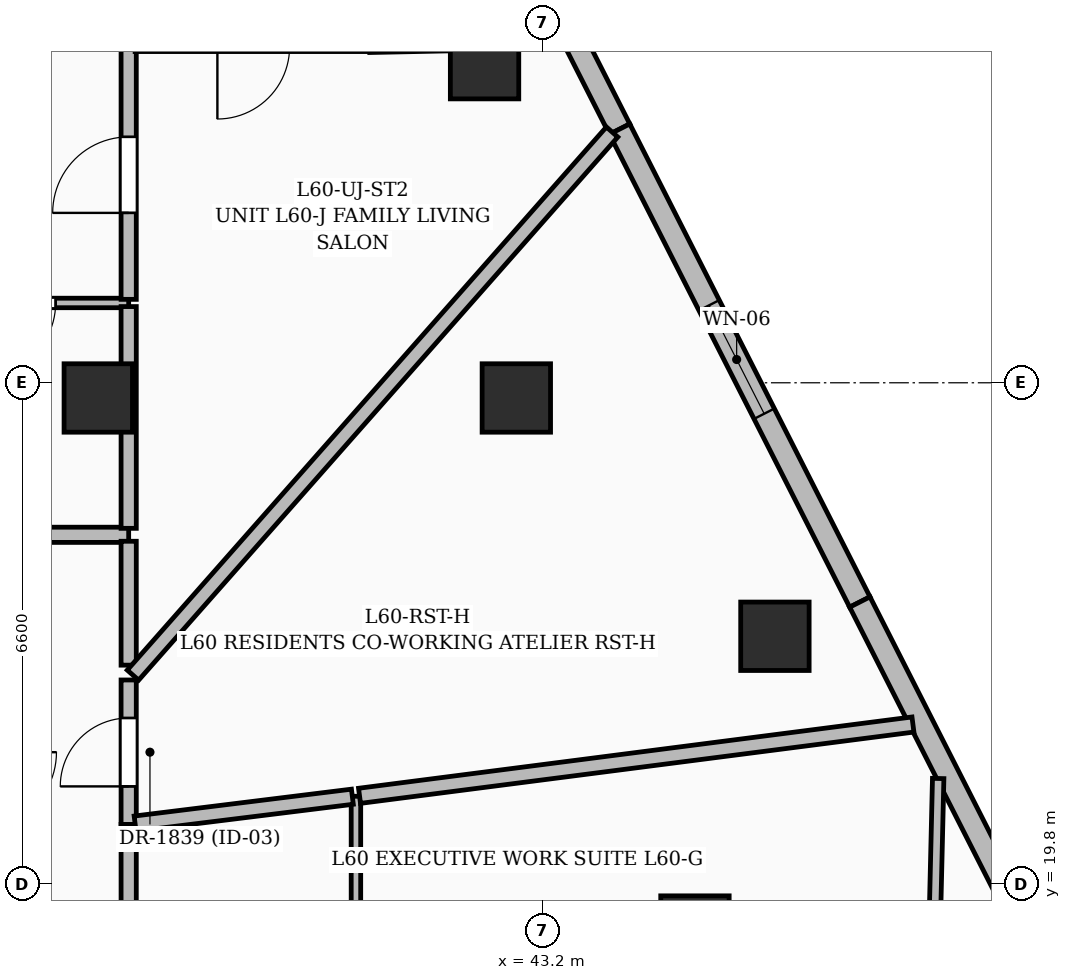
"""IFC4 building model, lengths in metres.
Left out: names, types, materials, properties, quantities, classifications, styles, units other than length and angle.
Written with IfcOpenShell. Run it as: python <this file> out.ifc"""

import sys

from ifc_helpers import new_model, si_unit, direction, frame, frame_2d, origin, origin_2d, place, context, subcontext, project, spatial, rectangle, extrude, element, fill, save


model = new_model("IFC4")
c1 = context("Model", 3, precision=1e-05, world=origin(), true_north=direction((0.0, 1.0)))
c2 = subcontext(c1, "Body", "Model", "MODEL_VIEW")
j1 = project(units=[si_unit("LENGTHUNIT", "METRE"), si_unit("PLANEANGLEUNIT", "RADIAN")], contexts=[c1])
p1 = place(None, origin())
s1 = spatial("IfcSite", under=j1, at=p1, CompositionType="ELEMENT")
p2 = place(p1, origin())
s2 = spatial("IfcBuilding", under=s1, at=p2, CompositionType="ELEMENT")
p3 = place(p2, frame((0.0, 0.0, 233.25)))
s3 = spatial("IfcBuildingStorey", under=s2, at=p3, CompositionType="ELEMENT", Elevation=233.25)
for number, where, z_axis, x_axis in (
    (1, (45.2, 19.2, 0.0), (0.0, 0.0, 1.0), (1.0, 0.0, 0.0)),
    (2, (42.85, 26.2, 0.0), (0.0, 0.0, 1.0), (1.0, 0.0, 0.0)),
    (3, (37.35, 26.2, 0.0), (0.0, 0.0, 1.0), (1.0, 0.0, 0.0)),
    (4, (46.252, 23.065, 0.0), (0.0, 0.0, 1.0), (1.0, 0.0, 0.0)),
    (5, (42.432, 30.585, 0.0), (0.0, 0.0, 1.0), (1.0, 0.0, 0.0)),
):
    element("IfcColumn", number, at=place(p3, frame(where, z_axis=z_axis, x_axis=x_axis)), inside=s3, PredefinedType="COLUMN", context=c2, shape_type="SweptSolid", body=[
        extrude(rectangle(XDim=0.9, YDim=0.9, at=origin_2d()), origin(), (0.0, 0.0, 1.0), 3.75),
    ])
p4 = place(p3, frame((41.313, 35.437, 0.0), z_axis=(0.0, 0.0, 1.0), x_axis=(0.452902075909, -0.891560266969, 0.0)))
e6 = element("IfcWall", 6, at=p4, inside=s3, PredefinedType="SOLIDWALL", context=c2, shape_type="SweptSolid", body=[
    extrude(rectangle(XDim=6.393, YDim=0.3, at=frame_2d((3.197, 0.0))), origin(), (0.0, 0.0, 1.0), 3.5),
])
p5 = place(p4, frame((1.79, 0.0, 0.6)))
e7 = element("IfcOpeningElement", 7, at=p5, cuts=e6, PredefinedType="OPENING", context=c2, shape_type="SweptSolid", body=[
    extrude(rectangle(XDim=1.8, YDim=2.1, at=frame_2d((0.9, 1.05))), frame((0.0, 0.16, 0.0), z_axis=(0.0, -1.0, 0.0), x_axis=(1.0, 0.0, 0.0)), (0.0, 0.0, 1.0), 0.32),
])
p6 = place(p3, frame((44.209, 29.737, 0.0), z_axis=(0.0, 0.0, 1.0), x_axis=(0.452858393735, -0.891582455651, 0.0)))
e8 = element("IfcWall", 8, at=p6, inside=s3, PredefinedType="SOLIDWALL", context=c2, shape_type="SweptSolid", body=[
    extrude(rectangle(XDim=6.978, YDim=0.3, at=frame_2d((3.489, 0.0))), origin(), (0.0, 0.0, 1.0), 3.5),
])
p7 = place(p6, frame((2.6, 0.0, 0.55)))
e9 = element("IfcOpeningElement", 9, at=p7, cuts=e8, PredefinedType="OPENING", context=c2, shape_type="SweptSolid", body=[
    extrude(rectangle(XDim=1.6, YDim=2.2, at=frame_2d((0.8, 1.1))), frame((0.0, 0.16, 0.0), z_axis=(0.0, -1.0, 0.0), x_axis=(1.0, 0.0, 0.0)), (0.0, 0.0, 1.0), 0.32),
])
p8 = place(p3, frame((47.369, 23.516, 0.0), z_axis=(0.0, 0.0, 1.0), x_axis=(0.452872520075, -0.891575280367, 0.0)))
e10 = element("IfcWall", 10, at=p8, inside=s3, PredefinedType="SOLIDWALL", context=c2, shape_type="SweptSolid", body=[
    extrude(rectangle(XDim=6.978, YDim=0.3, at=frame_2d((3.489, 0.0))), origin(), (0.0, 0.0, 1.0), 3.5),
])
p9 = place(p8, frame((4.15, 0.0, 0.6)))
e11 = element("IfcOpeningElement", 11, at=p9, cuts=e10, PredefinedType="OPENING", context=c2, shape_type="SweptSolid", body=[
    extrude(rectangle(XDim=1.5, YDim=2.1, at=frame_2d((0.75, 1.05))), frame((0.0, 0.16, 0.0), z_axis=(0.0, -1.0, 0.0), x_axis=(1.0, 0.0, 0.0)), (0.0, 0.0, 1.0), 0.32),
])
p10 = place(p3, frame((37.75, 16.835, 0.0), z_axis=(0.0, 0.0, 1.0), x_axis=(0.0, 1.0, 0.0)))
e12 = element("IfcWall", 12, at=p10, inside=s3, PredefinedType="PARTITIONING", context=c2, shape_type="SweptSolid", body=[
    extrude(rectangle(XDim=3.755, YDim=0.2, at=frame_2d((1.877, 0.0))), origin(), (0.0, 0.0, 1.0), 3.5),
])
p11 = place(p3, frame((37.75, 20.59, 0.0), z_axis=(0.0, 0.0, 1.0), x_axis=(0.0, 1.0, 0.0)))
e13 = element("IfcWall", 13, at=p11, inside=s3, PredefinedType="PARTITIONING", context=c2, shape_type="SweptSolid", body=[
    extrude(rectangle(XDim=1.9, YDim=0.2, at=frame_2d((0.95, 0.0))), origin(), (0.0, 0.0, 1.0), 3.5),
])
p12 = place(p11, frame((0.5, 0.0, 0.0)))
e14 = element("IfcOpeningElement", 14, at=p12, cuts=e13, PredefinedType="OPENING", context=c2, shape_type="SweptSolid", body=[
    extrude(rectangle(XDim=0.9, YDim=2.1, at=frame_2d((0.45, 1.05))), frame((0.0, 0.11, 0.0), z_axis=(0.0, -1.0, 0.0), x_axis=(1.0, 0.0, 0.0)), (0.0, 0.0, 1.0), 0.22),
])
p13 = place(p3, frame((37.75, 24.4, 0.0), z_axis=(0.0, 0.0, 1.0), x_axis=(-1.0, 0.0, 0.0)))
e15 = element("IfcWall", 15, at=p13, inside=s3, PredefinedType="PARTITIONING", context=c2, shape_type="SweptSolid", body=[
    extrude(rectangle(XDim=1.95, YDim=0.2, at=frame_2d((0.975, 0.0))), origin(), (0.0, 0.0, 1.0), 2.685),
])
p14 = place(p3, frame((37.75, 22.685, 0.0), z_axis=(0.0, 0.0, 1.0), x_axis=(0.0, 1.0, 0.0)))
e16 = element("IfcWall", 16, at=p14, inside=s3, PredefinedType="PARTITIONING", context=c2, shape_type="SweptSolid", body=[
    extrude(rectangle(XDim=1.63, YDim=0.2, at=frame_2d((0.815, 0.0))), origin(), (0.0, 0.0, 1.0), 3.5),
])
p15 = place(p3, frame((48.3, 16.96, 0.0), z_axis=(0.0, 0.0, 1.0), x_axis=(0.023576446584, 0.999722036951, 0.0)))
e17 = element("IfcWall", 17, at=p15, inside=s3, PredefinedType="PARTITIONING", context=c2, shape_type="SweptSolid", body=[
    extrude(rectangle(XDim=4.235, YDim=0.15, at=frame_2d((2.118, 0.0))), origin(), (0.0, 0.0, 1.0), 2.82),
])
p16 = place(p15, frame((1.679, 0.0, 0.0)))
e18 = element("IfcOpeningElement", 18, at=p16, cuts=e17, PredefinedType="OPENING", context=c2, shape_type="SweptSolid", body=[
    extrude(rectangle(XDim=0.85, YDim=2.1, at=frame_2d((0.425, 1.05))), frame((0.0, 0.085, 0.0), z_axis=(0.0, -1.0, 0.0), x_axis=(1.0, 0.0, 0.0)), (0.0, 0.0, 1.0), 0.17),
])
p17 = place(p3, frame((40.74, 20.96, 0.0), z_axis=(0.0, 0.0, 1.0), x_axis=(0.0, -1.0, 0.0)))
e19 = element("IfcWall", 19, at=p17, inside=s3, PredefinedType="PARTITIONING", context=c2, shape_type="SweptSolid", body=[
    extrude(rectangle(XDim=4.0, YDim=0.125, at=frame_2d((2.0, 0.0))), origin(), (0.0, 0.0, 1.0), 3.5),
])
p18 = place(p17, frame((1.525, 0.0, 0.0)))
e20 = element("IfcOpeningElement", 20, at=p18, cuts=e19, PredefinedType="OPENING", context=c2, shape_type="SweptSolid", body=[
    extrude(rectangle(XDim=0.95, YDim=2.2, at=frame_2d((0.475, 1.1))), frame((0.0, 0.072, 0.0), z_axis=(0.0, -1.0, 0.0), x_axis=(1.0, 0.0, 0.0)), (0.0, 0.0, 1.0), 0.145),
])
p19 = place(p3, frame((48.068, 21.904, 0.0), z_axis=(0.0, 0.0, 1.0), x_axis=(-0.991803716191, -0.127770843899, 0.0)))
e21 = element("IfcWall", 21, at=p19, inside=s3, PredefinedType="PARTITIONING", context=c2, shape_type="SweptSolid", body=[
    extrude(rectangle(XDim=7.341, YDim=0.2, at=frame_2d((3.67, 0.0))), origin(), (0.0, 0.0, 1.0), 2.685),
])
p20 = place(p3, frame((40.693, 20.954, 0.0), z_axis=(0.0, 0.0, 1.0), x_axis=(-0.992428411634, -0.122824459212, 0.0)))
e22 = element("IfcWall", 22, at=p20, inside=s3, PredefinedType="PARTITIONING", context=c2, shape_type="SweptSolid", body=[
    extrude(rectangle(XDim=2.88, YDim=0.2, at=frame_2d((1.44, 0.0))), origin(), (0.0, 0.0, 1.0), 3.5),
])
p21 = place(p3, frame((44.11, 29.699, 0.0), z_axis=(0.0, 0.0, 1.0), x_axis=(-0.661580960231, -0.749873744746, 0.0)))
e23 = element("IfcWall", 23, at=p21, inside=s3, PredefinedType="PARTITIONING", context=c2, shape_type="SweptSolid", body=[
    extrude(rectangle(XDim=9.529, YDim=0.2, at=frame_2d((4.764, 0.0))), origin(), (0.0, 0.0, 1.0), 2.685),
])
p22 = place(p3, frame((37.75, 27.45, 0.0), z_axis=(0.0, 0.0, 1.0), x_axis=(-1.0, 0.0, 0.0)))
e24 = element("IfcWall", 24, at=p22, inside=s3, PredefinedType="PARTITIONING", context=c2, shape_type="SweptSolid", body=[
    extrude(rectangle(XDim=2.52, YDim=0.125, at=frame_2d((1.26, 0.0))), origin(), (0.0, 0.0, 1.0), 2.685),
])
p23 = place(p22, frame((0.961, 0.0, 0.0)))
e25 = element("IfcOpeningElement", 25, at=p23, cuts=e24, PredefinedType="OPENING", context=c2, shape_type="SweptSolid", body=[
    extrude(rectangle(XDim=0.95, YDim=2.2, at=frame_2d((0.475, 1.1))), frame((0.0, 0.072, 0.0), z_axis=(0.0, -1.0, 0.0), x_axis=(1.0, 0.0, 0.0)), (0.0, 0.0, 1.0), 0.145),
])
p24 = place(p3, frame((37.75, 24.485, 0.0), z_axis=(0.0, 0.0, 1.0), x_axis=(0.0, 1.0, 0.0)))
e26 = element("IfcWall", 26, at=p24, inside=s3, PredefinedType="PARTITIONING", context=c2, shape_type="SweptSolid", body=[
    extrude(rectangle(XDim=2.917, YDim=0.2, at=frame_2d((1.459, 0.0))), origin(), (0.0, 0.0, 1.0), 2.685),
])
p25 = place(p3, frame((37.75, 27.498, 0.0), z_axis=(0.0, 0.0, 1.0), x_axis=(0.0, 1.0, 0.0)))
e27 = element("IfcWall", 27, at=p25, inside=s3, PredefinedType="PARTITIONING", context=c2, shape_type="SweptSolid", body=[
    extrude(rectangle(XDim=3.323, YDim=0.2, at=frame_2d((1.661, 0.0))), origin(), (0.0, 0.0, 1.0), 2.82),
])
p26 = place(p25, frame((1.137, 0.0, 0.0)))
e28 = element("IfcOpeningElement", 28, at=p26, cuts=e27, PredefinedType="OPENING", context=c2, shape_type="SweptSolid", body=[
    extrude(rectangle(XDim=1.0, YDim=2.2, at=frame_2d((0.5, 1.1))), frame((0.0, 0.11, 0.0), z_axis=(0.0, -1.0, 0.0), x_axis=(1.0, 0.0, 0.0)), (0.0, 0.0, 1.0), 0.22),
])
p27 = place(p3, frame((43.5, 30.873, 0.0), z_axis=(0.0, 0.0, 1.0), x_axis=(-0.999789250499, -0.020529359137, 0.0)))
e29 = element("IfcWall", 29, at=p27, inside=s3, PredefinedType="PARTITIONING", context=c2, shape_type="SweptSolid", body=[
    extrude(rectangle(XDim=2.581, YDim=0.15, at=frame_2d((1.29, 0.0))), origin(), (0.0, 0.0, 1.0), 2.82),
])
p28 = place(p7, origin())
e30 = element("IfcWindow", 30, at=p28, inside=s3, PartitioningType="SINGLE_PANEL", PredefinedType="WINDOW", context=c2, shape_type="SweptSolid", body=[
    extrude(rectangle(XDim=1.6, YDim=2.2, at=frame_2d((0.8, 1.1))), frame((0.0, 0.03, 0.0), z_axis=(0.0, -1.0, 0.0), x_axis=(1.0, 0.0, 0.0)), (0.0, 0.0, 1.0), 0.06),
])
fill(e9, e30)
p29 = place(p12, origin())
e31 = element("IfcDoor", 31, at=p29, inside=s3, OperationType="SINGLE_SWING_LEFT", PredefinedType="DOOR", context=c2, shape_type="SweptSolid", body=[
    extrude(rectangle(XDim=0.9, YDim=2.1, at=frame_2d((0.45, 1.05))), frame((0.0, 0.025, 0.0), z_axis=(0.0, -1.0, 0.0), x_axis=(1.0, 0.0, 0.0)), (0.0, 0.0, 1.0), 0.05),
])
fill(e14, e31)
p30 = place(p23, origin())
e32 = element("IfcDoor", 32, at=p30, inside=s3, OperationType="SINGLE_SWING_RIGHT", PredefinedType="DOOR", context=c2, shape_type="SweptSolid", body=[
    extrude(rectangle(XDim=0.95, YDim=2.2, at=frame_2d((0.475, 1.1))), frame((0.0, 0.025, 0.0), z_axis=(0.0, -1.0, 0.0), x_axis=(1.0, 0.0, 0.0)), (0.0, 0.0, 1.0), 0.05),
])
fill(e25, e32)
p31 = place(p26, origin())
e33 = element("IfcDoor", 33, at=p31, inside=s3, OperationType="SINGLE_SWING_LEFT", PredefinedType="DOOR", context=c2, shape_type="SweptSolid", body=[
    extrude(rectangle(XDim=1.0, YDim=2.2, at=frame_2d((0.5, 1.1))), frame((0.0, 0.025, 0.0), z_axis=(0.0, -1.0, 0.0), x_axis=(1.0, 0.0, 0.0)), (0.0, 0.0, 1.0), 0.05),
])
fill(e28, e33)
save(model, sys.argv[1])
